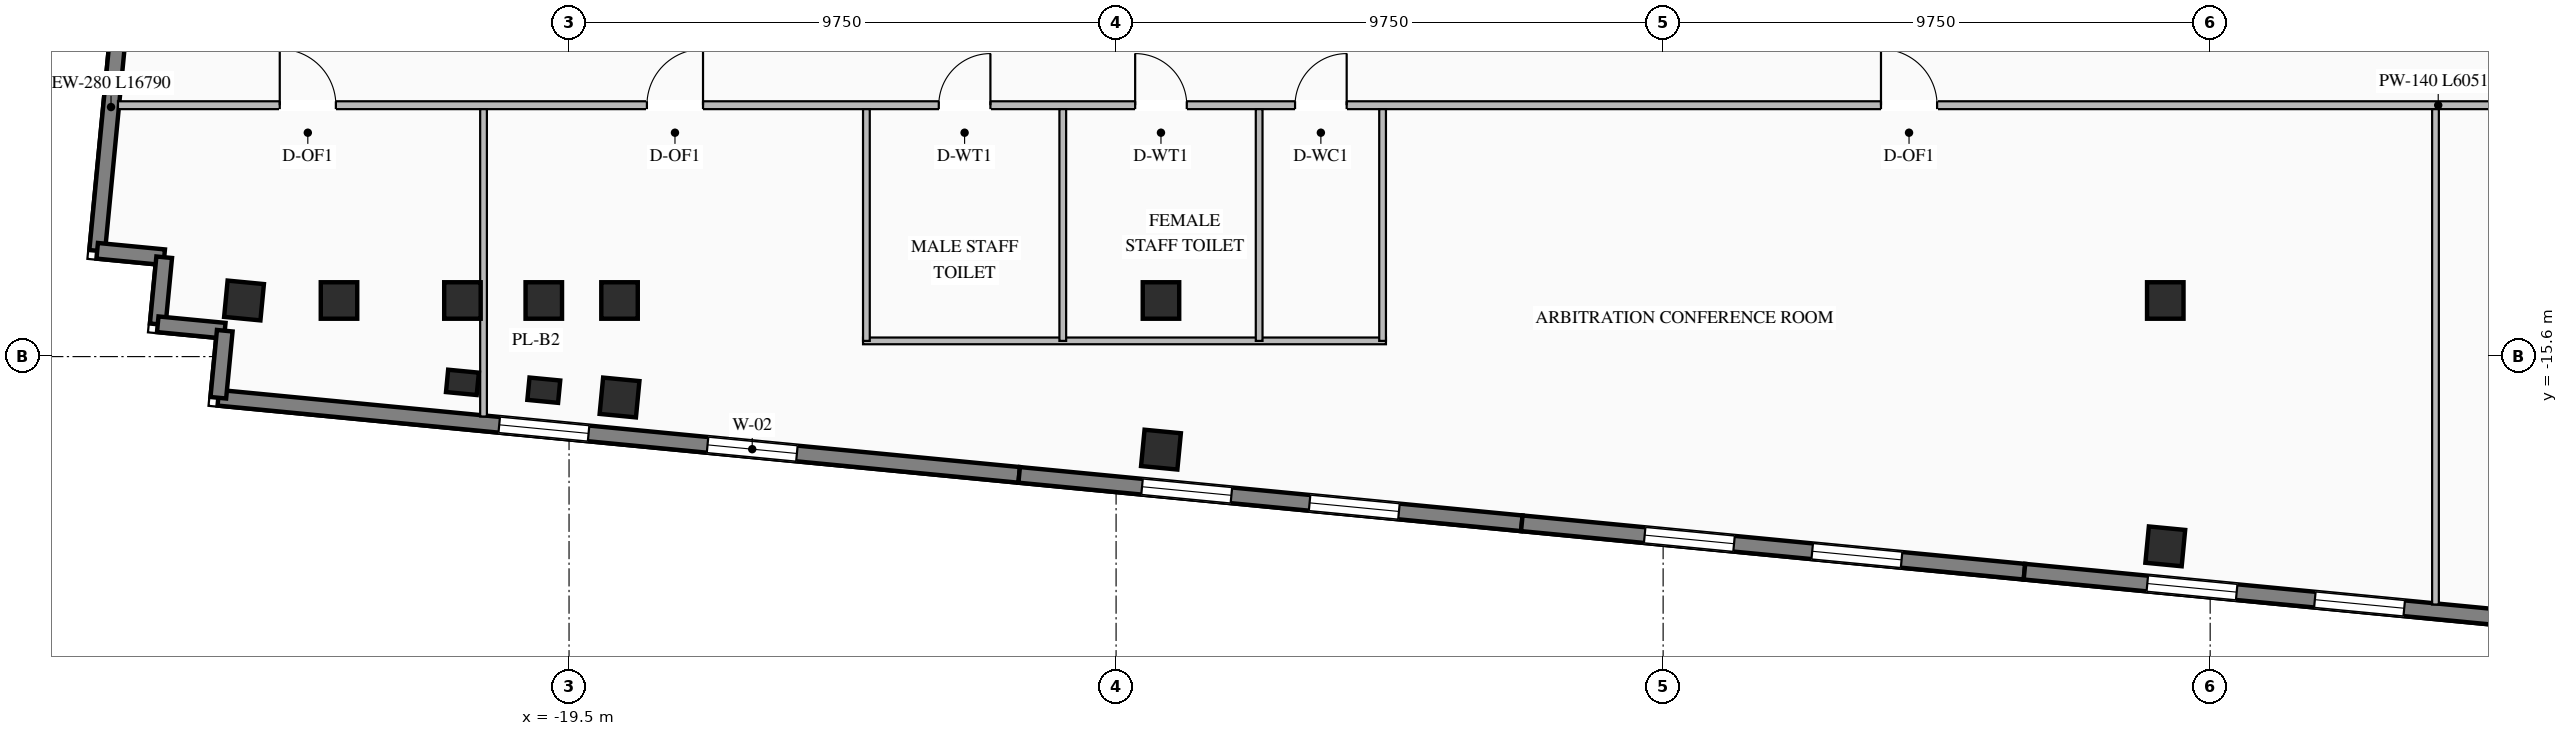
"""IFC4 building model, lengths in metres.
Left out: names, types, materials, properties, quantities, classifications, styles, units other than length and angle.
Written with IfcOpenShell. Run it as: python <this file> out.ifc"""

import sys

from ifc_helpers import new_model, si_unit, direction, frame, frame_2d, origin, origin_2d, place, context, subcontext, project, spatial, rectangle, i_section, extrude, element, fill, save


model = new_model("IFC4")
c1 = context("Model", 3, precision=1e-05, world=origin(), true_north=direction((0.0, 1.0)))
c2 = subcontext(c1, "Body", "Model", "MODEL_VIEW")
j1 = project(units=[si_unit("LENGTHUNIT", "METRE"), si_unit("PLANEANGLEUNIT", "RADIAN")], contexts=[c1])
p1 = place(None, origin())
s1 = spatial("IfcSite", under=j1, at=p1, CompositionType="ELEMENT")
p2 = place(p1, origin())
s2 = spatial("IfcBuilding", under=s1, at=p2, CompositionType="ELEMENT")
p3 = place(p2, frame((0.0, 0.0, 160.4)))
s3 = spatial("IfcBuildingStorey", under=s2, at=p3, CompositionType="ELEMENT", Elevation=160.4)
for number, where, z_axis, x_axis in (
    (1, (-21.4, -14.6, 0.0), (0.0, 0.0, 1.0), (1.0, 0.0, 0.0)),
    (2, (-19.95, -14.6, 0.0), (0.0, 0.0, 1.0), (1.0, 0.0, 0.0)),
    (3, (-18.6, -14.6, 0.0), (0.0, 0.0, 1.0), (1.0, 0.0, 0.0)),
    (4, (-8.95, -14.6, 0.0), (0.0, 0.0, 1.0), (1.0, 0.0, 0.0)),
    (5, (8.95, -14.6, 0.0), (0.0, 0.0, 1.0), (1.0, 0.0, 0.0)),
    (6, (-23.6, -14.6, 0.0), (0.0, 0.0, 1.0), (1.0, 0.0, 0.0)),
    (7, (-18.6, -16.329, 0.0), (0.0, 0.0, 1.0), (0.995, -0.096, 0.0)),
    (8, (-8.95, -17.258, 0.0), (0.0, 0.0, 1.0), (0.995, -0.096, 0.0)),
    (9, (8.95, -18.981, 0.0), (0.0, 0.0, 1.0), (0.995, -0.096, 0.0)),
    (10, (-25.293, -14.6, 0.0), (0.0, 0.0, 1.0), (0.995, -0.096, 0.0)),
):
    element("IfcColumn", number, at=place(p3, frame(where, z_axis=z_axis, x_axis=x_axis)), inside=s3, PredefinedType="COLUMN", context=c2, shape_type="SweptSolid", body=[
        extrude(i_section(OverallWidth=0.65, OverallDepth=0.65, WebThickness=0.028, FlangeThickness=0.04, at=origin_2d()), origin(), (0.0, 0.0, 1.0), 3.45),
    ])
for number, where, z_axis, x_axis in (
    (11, (-21.4, -16.059, 0.0), (0.0, 0.0, 1.0), (0.995, -0.096, 0.0)),
    (12, (-19.95, -16.199, 0.0), (0.0, 0.0, 1.0), (0.995, -0.096, 0.0)),
):
    element("IfcColumn", number, at=place(p3, frame(where, z_axis=z_axis, x_axis=x_axis)), inside=s3, PredefinedType="PILASTER", context=c2, shape_type="SweptSolid", body=[
        extrude(rectangle(XDim=0.55, YDim=0.4, at=origin_2d()), origin(), (0.0, 0.0, 1.0), 3.45),
    ])
p4 = place(p3, frame((-11.477, -17.708, 0.0), z_axis=(0.0, 0.0, 1.0), x_axis=(-0.995395762701, 0.095850276977, 0.0)))
e13 = element("IfcWall", 13, at=p4, inside=s3, PredefinedType="STANDARD", context=c2, shape_type="SweptSolid", body=[
    extrude(rectangle(XDim=14.34, YDim=0.28, at=frame_2d((7.17, 0.0))), origin(), (0.0, 0.0, 1.0), 3.25),
])
p5 = place(p4, frame((3.98, 0.0, 0.76)))
e14 = element("IfcOpeningElement", 14, at=p5, cuts=e13, PredefinedType="OPENING", context=c2, shape_type="SweptSolid", body=[
    extrude(rectangle(XDim=1.6, YDim=1.95, at=frame_2d((0.8, 0.975))), frame((0.0, 0.15, 0.0), z_axis=(0.0, -1.0, 0.0), x_axis=(1.0, 0.0, 0.0)), (0.0, 0.0, 1.0), 0.3),
])
p6 = place(p4, frame((7.71, 0.0, 0.76)))
e15 = element("IfcOpeningElement", 15, at=p6, cuts=e13, PredefinedType="OPENING", context=c2, shape_type="SweptSolid", body=[
    extrude(rectangle(XDim=1.6, YDim=1.95, at=frame_2d((0.8, 0.975))), frame((0.0, 0.15, 0.0), z_axis=(0.0, -1.0, 0.0), x_axis=(1.0, 0.0, 0.0)), (0.0, 0.0, 1.0), 0.3),
])
p7 = place(p3, frame((-2.519, -18.57, 0.0), z_axis=(0.0, 0.0, 1.0), x_axis=(-0.995396794462, 0.09583956164, 0.0)))
e16 = element("IfcWall", 16, at=p7, inside=s3, PredefinedType="STANDARD", context=c2, shape_type="SweptSolid", body=[
    extrude(rectangle(XDim=9.0, YDim=0.28, at=frame_2d((4.5, 0.0))), origin(), (0.0, 0.0, 1.0), 3.25),
])
p8 = place(p7, frame((2.2, 0.0, 0.76)))
e17 = element("IfcOpeningElement", 17, at=p8, cuts=e16, PredefinedType="OPENING", context=c2, shape_type="SweptSolid", body=[
    extrude(rectangle(XDim=1.6, YDim=1.95, at=frame_2d((0.8, 0.975))), frame((0.0, 0.15, 0.0), z_axis=(0.0, -1.0, 0.0), x_axis=(1.0, 0.0, 0.0)), (0.0, 0.0, 1.0), 0.3),
])
p9 = place(p7, frame((5.2, 0.0, 0.76)))
e18 = element("IfcOpeningElement", 18, at=p9, cuts=e16, PredefinedType="OPENING", context=c2, shape_type="SweptSolid", body=[
    extrude(rectangle(XDim=1.6, YDim=1.95, at=frame_2d((0.8, 0.975))), frame((0.0, 0.15, 0.0), z_axis=(0.0, -1.0, 0.0), x_axis=(1.0, 0.0, 0.0)), (0.0, 0.0, 1.0), 0.3),
])
p10 = place(p3, frame((6.44, -19.433, 0.0), z_axis=(0.0, 0.0, 1.0), x_axis=(-0.995396794462, 0.09583956164, 0.0)))
e19 = element("IfcWall", 19, at=p10, inside=s3, PredefinedType="STANDARD", context=c2, shape_type="SweptSolid", body=[
    extrude(rectangle(XDim=9.0, YDim=0.28, at=frame_2d((4.5, 0.0))), origin(), (0.0, 0.0, 1.0), 3.25),
])
p11 = place(p10, frame((2.2, 0.0, 0.76)))
e20 = element("IfcOpeningElement", 20, at=p11, cuts=e19, PredefinedType="OPENING", context=c2, shape_type="SweptSolid", body=[
    extrude(rectangle(XDim=1.6, YDim=1.95, at=frame_2d((0.8, 0.975))), frame((0.0, 0.15, 0.0), z_axis=(0.0, -1.0, 0.0), x_axis=(1.0, 0.0, 0.0)), (0.0, 0.0, 1.0), 0.3),
])
p12 = place(p10, frame((5.2, 0.0, 0.76)))
e21 = element("IfcOpeningElement", 21, at=p12, cuts=e19, PredefinedType="OPENING", context=c2, shape_type="SweptSolid", body=[
    extrude(rectangle(XDim=1.6, YDim=1.95, at=frame_2d((0.8, 0.975))), frame((0.0, 0.15, 0.0), z_axis=(0.0, -1.0, 0.0), x_axis=(1.0, 0.0, 0.0)), (0.0, 0.0, 1.0), 0.3),
])
p13 = place(p3, frame((15.399, -20.296, 0.0), z_axis=(0.0, 0.0, 1.0), x_axis=(-0.995394455533, 0.09586385082, 0.0)))
e22 = element("IfcWall", 22, at=p13, inside=s3, PredefinedType="STANDARD", context=c2, shape_type="SweptSolid", body=[
    extrude(rectangle(XDim=9.0, YDim=0.28, at=frame_2d((4.5, 0.0))), origin(), (0.0, 0.0, 1.0), 3.25),
])
p14 = place(p13, frame((2.2, 0.0, 0.76)))
e23 = element("IfcOpeningElement", 23, at=p14, cuts=e22, PredefinedType="OPENING", context=c2, shape_type="SweptSolid", body=[
    extrude(rectangle(XDim=1.6, YDim=1.95, at=frame_2d((0.8, 0.975))), frame((0.0, 0.15, 0.0), z_axis=(0.0, -1.0, 0.0), x_axis=(1.0, 0.0, 0.0)), (0.0, 0.0, 1.0), 0.3),
])
p15 = place(p13, frame((5.2, 0.0, 0.76)))
e24 = element("IfcOpeningElement", 24, at=p15, cuts=e22, PredefinedType="OPENING", context=c2, shape_type="SweptSolid", body=[
    extrude(rectangle(XDim=1.6, YDim=1.95, at=frame_2d((0.8, 0.975))), frame((0.0, 0.15, 0.0), z_axis=(0.0, -1.0, 0.0), x_axis=(1.0, 0.0, 0.0)), (0.0, 0.0, 1.0), 0.3),
])
p16 = place(p3, frame((-27.91, -13.714, 0.0), z_axis=(0.0, 0.0, 1.0), x_axis=(0.095839027265, 0.995396845913, 0.0)))
e25 = element("IfcWall", 25, at=p16, inside=s3, PredefinedType="STANDARD", context=c2, shape_type="SweptSolid", body=[
    extrude(rectangle(XDim=16.79, YDim=0.28, at=frame_2d((8.395, 0.0))), origin(), (0.0, 0.0, 1.0), 3.25),
])
p17 = place(p16, frame((5.147, 0.0, 0.76)))
e26 = element("IfcOpeningElement", 26, at=p17, cuts=e25, PredefinedType="OPENING", context=c2, shape_type="SweptSolid", body=[
    extrude(rectangle(XDim=2.0, YDim=2.05, at=frame_2d((1.0, 1.025))), frame((0.0, 0.15, 0.0), z_axis=(0.0, -1.0, 0.0), x_axis=(1.0, 0.0, 0.0)), (0.0, 0.0, 1.0), 0.3),
])
p18 = place(p16, frame((10.193, 0.0, 0.76)))
e27 = element("IfcOpeningElement", 27, at=p18, cuts=e25, PredefinedType="OPENING", context=c2, shape_type="SweptSolid", body=[
    extrude(rectangle(XDim=2.0, YDim=2.05, at=frame_2d((1.0, 1.025))), frame((0.0, 0.15, 0.0), z_axis=(0.0, -1.0, 0.0), x_axis=(1.0, 0.0, 0.0)), (0.0, 0.0, 1.0), 0.3),
])
p19 = place(p3, frame((-27.91, -13.714, 0.0), z_axis=(0.0, 0.0, 1.0), x_axis=(0.995397091755, -0.095836473879, 0.0)))
e28 = element("IfcWall", 28, at=p19, inside=s3, PredefinedType="STANDARD", context=c2, shape_type="SweptSolid", body=[
    extrude(rectangle(XDim=1.2, YDim=0.28, at=frame_2d((0.6, 0.0))), origin(), (0.0, 0.0, 1.0), 3.25),
])
for number, where, z_axis, x_axis in (
    (29, (-26.716, -13.829, 0.0), (0.0, 0.0, 1.0), (-0.096, -0.995, 0.0)),
    (30, (-26.831, -15.024, 0.0), (0.0, 0.0, 1.0), (0.995, -0.096, 0.0)),
):
    element("IfcWall", number, at=place(p3, frame(where, z_axis=z_axis, x_axis=x_axis)), inside=s3, PredefinedType="STANDARD", context=c2, shape_type="SweptSolid", body=[
        extrude(rectangle(XDim=1.2, YDim=0.28, at=frame_2d((0.6, 0.0))), origin(), (0.0, 0.0, 1.0), 3.25),
    ])
p20 = place(p3, frame((-25.636, -15.139, 0.0), z_axis=(0.0, 0.0, 1.0), x_axis=(-0.096038073607, -0.995377661201, 0.0)))
e31 = element("IfcWall", 31, at=p20, inside=s3, PredefinedType="STANDARD", context=c2, shape_type="SweptSolid", body=[
    extrude(rectangle(XDim=1.2, YDim=0.28, at=frame_2d((0.6, 0.0))), origin(), (0.0, 0.0, 1.0), 3.25),
])
p21 = place(p3, frame((-27.54, -11.12, 0.0), z_axis=(0.0, 0.0, 1.0), x_axis=(1.0, 0.0, 0.0)))
e32 = element("IfcWall", 32, at=p21, inside=s3, PredefinedType="STANDARD", context=c2, shape_type="SweptSolid", body=[
    extrude(rectangle(XDim=60.519, YDim=0.14, at=frame_2d((30.259, 0.0))), origin(), (0.0, 0.0, 1.0), 3.25),
])
p22 = place(p21, frame((14.63, 0.0, 0.0)))
e33 = element("IfcOpeningElement", 33, at=p22, cuts=e32, PredefinedType="OPENING", context=c2, shape_type="SweptSolid", body=[
    extrude(rectangle(XDim=0.92, YDim=2.08, at=frame_2d((0.46, 1.04))), frame((0.0, 0.08, 0.0), z_axis=(0.0, -1.0, 0.0), x_axis=(1.0, 0.0, 0.0)), (0.0, 0.0, 1.0), 0.16),
])
p23 = place(p21, frame((18.13, 0.0, 0.0)))
e34 = element("IfcOpeningElement", 34, at=p23, cuts=e32, PredefinedType="OPENING", context=c2, shape_type="SweptSolid", body=[
    extrude(rectangle(XDim=0.92, YDim=2.08, at=frame_2d((0.46, 1.04))), frame((0.0, 0.08, 0.0), z_axis=(0.0, -1.0, 0.0), x_axis=(1.0, 0.0, 0.0)), (0.0, 0.0, 1.0), 0.16),
])
p24 = place(p21, frame((20.98, 0.0, 0.0)))
e35 = element("IfcOpeningElement", 35, at=p24, cuts=e32, PredefinedType="OPENING", context=c2, shape_type="SweptSolid", body=[
    extrude(rectangle(XDim=0.92, YDim=2.08, at=frame_2d((0.46, 1.04))), frame((0.0, 0.08, 0.0), z_axis=(0.0, -1.0, 0.0), x_axis=(1.0, 0.0, 0.0)), (0.0, 0.0, 1.0), 0.16),
])
p25 = place(p21, frame((2.884, 0.0, 0.0)))
e36 = element("IfcOpeningElement", 36, at=p25, cuts=e32, PredefinedType="OPENING", context=c2, shape_type="SweptSolid", body=[
    extrude(rectangle(XDim=1.0, YDim=2.08, at=frame_2d((0.5, 1.04))), frame((0.0, 0.08, 0.0), z_axis=(0.0, -1.0, 0.0), x_axis=(1.0, 0.0, 0.0)), (0.0, 0.0, 1.0), 0.16),
])
p26 = place(p21, frame((9.428, 0.0, 0.0)))
e37 = element("IfcOpeningElement", 37, at=p26, cuts=e32, PredefinedType="OPENING", context=c2, shape_type="SweptSolid", body=[
    extrude(rectangle(XDim=1.0, YDim=2.08, at=frame_2d((0.5, 1.04))), frame((0.0, 0.08, 0.0), z_axis=(0.0, -1.0, 0.0), x_axis=(1.0, 0.0, 0.0)), (0.0, 0.0, 1.0), 0.16),
])
p27 = place(p21, frame((31.423, 0.0, 0.0)))
e38 = element("IfcOpeningElement", 38, at=p27, cuts=e32, PredefinedType="OPENING", context=c2, shape_type="SweptSolid", body=[
    extrude(rectangle(XDim=1.0, YDim=2.08, at=frame_2d((0.5, 1.04))), frame((0.0, 0.08, 0.0), z_axis=(0.0, -1.0, 0.0), x_axis=(1.0, 0.0, 0.0)), (0.0, 0.0, 1.0), 0.16),
])
p28 = place(p21, frame((50.286, 0.0, 0.0)))
e39 = element("IfcOpeningElement", 39, at=p28, cuts=e32, PredefinedType="OPENING", context=c2, shape_type="SweptSolid", body=[
    extrude(rectangle(XDim=1.0, YDim=2.08, at=frame_2d((0.5, 1.04))), frame((0.0, 0.08, 0.0), z_axis=(0.0, -1.0, 0.0), x_axis=(1.0, 0.0, 0.0)), (0.0, 0.0, 1.0), 0.16),
])
p29 = place(p3, frame((-14.26, -15.32, 0.0), z_axis=(0.0, 0.0, 1.0), x_axis=(1.0, 0.0, 0.0)))
e40 = element("IfcWall", 40, at=p29, inside=s3, PredefinedType="STANDARD", context=c2, shape_type="SweptSolid", body=[
    extrude(rectangle(XDim=9.32, YDim=0.12, at=frame_2d((4.66, 0.0))), origin(), (0.0, 0.0, 1.0), 3.25),
])
for number, where, z_axis, x_axis in (
    (41, (-14.2, -15.32, 0.0), (0.0, 0.0, 1.0), (0.0, 1.0, 0.0)),
    (42, (-10.7, -15.32, 0.0), (0.0, 0.0, 1.0), (0.0, 1.0, 0.0)),
    (43, (-7.2, -15.32, 0.0), (0.0, 0.0, 1.0), (0.0, 1.0, 0.0)),
    (44, (-5.0, -15.32, 0.0), (0.0, 0.0, 1.0), (0.0, 1.0, 0.0)),
):
    element("IfcWall", number, at=place(p3, frame(where, z_axis=z_axis, x_axis=x_axis)), inside=s3, PredefinedType="STANDARD", context=c2, shape_type="SweptSolid", body=[
        extrude(rectangle(XDim=4.13, YDim=0.12, at=frame_2d((2.065, 0.0))), origin(), (0.0, 0.0, 1.0), 3.25),
    ])
p30 = place(p3, frame((-21.024, -16.668, 0.0), z_axis=(0.0, 0.0, 1.0), x_axis=(0.0, 1.0, 0.0)))
e45 = element("IfcWall", 45, at=p30, inside=s3, PredefinedType="STANDARD", context=c2, shape_type="SweptSolid", body=[
    extrude(rectangle(XDim=5.478, YDim=0.12, at=frame_2d((2.739, 0.0))), origin(), (0.0, 0.0, 1.0), 3.25),
])
p31 = place(p3, frame((13.766, -20.018, 0.0), z_axis=(0.0, 0.0, 1.0), x_axis=(0.0, 1.0, 0.0)))
e46 = element("IfcWall", 46, at=p31, inside=s3, PredefinedType="STANDARD", context=c2, shape_type="SweptSolid", body=[
    extrude(rectangle(XDim=8.828, YDim=0.12, at=frame_2d((4.414, 0.0))), origin(), (0.0, 0.0, 1.0), 3.25),
])
p32 = place(p5, origin())
e47 = element("IfcWindow", 47, at=p32, inside=s3, PartitioningType="SINGLE_PANEL", PredefinedType="WINDOW", context=c2, shape_type="SweptSolid", body=[
    extrude(rectangle(XDim=1.6, YDim=1.95, at=frame_2d((0.8, 0.975))), frame((0.0, 0.03, 0.0), z_axis=(0.0, -1.0, 0.0), x_axis=(1.0, 0.0, 0.0)), (0.0, 0.0, 1.0), 0.06),
])
fill(e14, e47)
p33 = place(p6, origin())
e48 = element("IfcWindow", 48, at=p33, inside=s3, PartitioningType="SINGLE_PANEL", PredefinedType="WINDOW", context=c2, shape_type="SweptSolid", body=[
    extrude(rectangle(XDim=1.6, YDim=1.95, at=frame_2d((0.8, 0.975))), frame((0.0, 0.03, 0.0), z_axis=(0.0, -1.0, 0.0), x_axis=(1.0, 0.0, 0.0)), (0.0, 0.0, 1.0), 0.06),
])
fill(e15, e48)
p34 = place(p8, origin())
e49 = element("IfcWindow", 49, at=p34, inside=s3, PartitioningType="SINGLE_PANEL", PredefinedType="WINDOW", context=c2, shape_type="SweptSolid", body=[
    extrude(rectangle(XDim=1.6, YDim=1.95, at=frame_2d((0.8, 0.975))), frame((0.0, 0.03, 0.0), z_axis=(0.0, -1.0, 0.0), x_axis=(1.0, 0.0, 0.0)), (0.0, 0.0, 1.0), 0.06),
])
fill(e17, e49)
p35 = place(p9, origin())
e50 = element("IfcWindow", 50, at=p35, inside=s3, PartitioningType="SINGLE_PANEL", PredefinedType="WINDOW", context=c2, shape_type="SweptSolid", body=[
    extrude(rectangle(XDim=1.6, YDim=1.95, at=frame_2d((0.8, 0.975))), frame((0.0, 0.03, 0.0), z_axis=(0.0, -1.0, 0.0), x_axis=(1.0, 0.0, 0.0)), (0.0, 0.0, 1.0), 0.06),
])
fill(e18, e50)
p36 = place(p11, origin())
e51 = element("IfcWindow", 51, at=p36, inside=s3, PartitioningType="SINGLE_PANEL", PredefinedType="WINDOW", context=c2, shape_type="SweptSolid", body=[
    extrude(rectangle(XDim=1.6, YDim=1.95, at=frame_2d((0.8, 0.975))), frame((0.0, 0.03, 0.0), z_axis=(0.0, -1.0, 0.0), x_axis=(1.0, 0.0, 0.0)), (0.0, 0.0, 1.0), 0.06),
])
fill(e20, e51)
p37 = place(p12, origin())
e52 = element("IfcWindow", 52, at=p37, inside=s3, PartitioningType="SINGLE_PANEL", PredefinedType="WINDOW", context=c2, shape_type="SweptSolid", body=[
    extrude(rectangle(XDim=1.6, YDim=1.95, at=frame_2d((0.8, 0.975))), frame((0.0, 0.03, 0.0), z_axis=(0.0, -1.0, 0.0), x_axis=(1.0, 0.0, 0.0)), (0.0, 0.0, 1.0), 0.06),
])
fill(e21, e52)
p38 = place(p14, origin())
e53 = element("IfcWindow", 53, at=p38, inside=s3, PartitioningType="SINGLE_PANEL", PredefinedType="WINDOW", context=c2, shape_type="SweptSolid", body=[
    extrude(rectangle(XDim=1.6, YDim=1.95, at=frame_2d((0.8, 0.975))), frame((0.0, 0.03, 0.0), z_axis=(0.0, -1.0, 0.0), x_axis=(1.0, 0.0, 0.0)), (0.0, 0.0, 1.0), 0.06),
])
fill(e23, e53)
p39 = place(p15, origin())
e54 = element("IfcWindow", 54, at=p39, inside=s3, PartitioningType="SINGLE_PANEL", PredefinedType="WINDOW", context=c2, shape_type="SweptSolid", body=[
    extrude(rectangle(XDim=1.6, YDim=1.95, at=frame_2d((0.8, 0.975))), frame((0.0, 0.03, 0.0), z_axis=(0.0, -1.0, 0.0), x_axis=(1.0, 0.0, 0.0)), (0.0, 0.0, 1.0), 0.06),
])
fill(e24, e54)
p40 = place(p22, origin())
e55 = element("IfcDoor", 55, at=p40, inside=s3, OperationType="SINGLE_SWING_RIGHT", PredefinedType="DOOR", context=c2, shape_type="SweptSolid", body=[
    extrude(rectangle(XDim=0.92, YDim=2.08, at=frame_2d((0.46, 1.04))), frame((0.0, 0.025, 0.0), z_axis=(0.0, -1.0, 0.0), x_axis=(1.0, 0.0, 0.0)), (0.0, 0.0, 1.0), 0.05),
])
fill(e33, e55)
p41 = place(p23, origin())
e56 = element("IfcDoor", 56, at=p41, inside=s3, OperationType="SINGLE_SWING_LEFT", PredefinedType="DOOR", context=c2, shape_type="SweptSolid", body=[
    extrude(rectangle(XDim=0.92, YDim=2.08, at=frame_2d((0.46, 1.04))), frame((0.0, 0.025, 0.0), z_axis=(0.0, -1.0, 0.0), x_axis=(1.0, 0.0, 0.0)), (0.0, 0.0, 1.0), 0.05),
])
fill(e34, e56)
p42 = place(p24, origin())
e57 = element("IfcDoor", 57, at=p42, inside=s3, OperationType="SINGLE_SWING_RIGHT", PredefinedType="DOOR", context=c2, shape_type="SweptSolid", body=[
    extrude(rectangle(XDim=0.92, YDim=2.08, at=frame_2d((0.46, 1.04))), frame((0.0, 0.025, 0.0), z_axis=(0.0, -1.0, 0.0), x_axis=(1.0, 0.0, 0.0)), (0.0, 0.0, 1.0), 0.05),
])
fill(e35, e57)
p43 = place(p25, origin())
e58 = element("IfcDoor", 58, at=p43, inside=s3, OperationType="SINGLE_SWING_LEFT", PredefinedType="DOOR", context=c2, shape_type="SweptSolid", body=[
    extrude(rectangle(XDim=1.0, YDim=2.08, at=frame_2d((0.5, 1.04))), frame((0.0, 0.025, 0.0), z_axis=(0.0, -1.0, 0.0), x_axis=(1.0, 0.0, 0.0)), (0.0, 0.0, 1.0), 0.05),
])
fill(e36, e58)
p44 = place(p26, origin())
e59 = element("IfcDoor", 59, at=p44, inside=s3, OperationType="SINGLE_SWING_RIGHT", PredefinedType="DOOR", context=c2, shape_type="SweptSolid", body=[
    extrude(rectangle(XDim=1.0, YDim=2.08, at=frame_2d((0.5, 1.04))), frame((0.0, 0.025, 0.0), z_axis=(0.0, -1.0, 0.0), x_axis=(1.0, 0.0, 0.0)), (0.0, 0.0, 1.0), 0.05),
])
fill(e37, e59)
p45 = place(p27, origin())
e60 = element("IfcDoor", 60, at=p45, inside=s3, OperationType="SINGLE_SWING_LEFT", PredefinedType="DOOR", context=c2, shape_type="SweptSolid", body=[
    extrude(rectangle(XDim=1.0, YDim=2.08, at=frame_2d((0.5, 1.04))), frame((0.0, 0.025, 0.0), z_axis=(0.0, -1.0, 0.0), x_axis=(1.0, 0.0, 0.0)), (0.0, 0.0, 1.0), 0.05),
])
fill(e38, e60)
save(model, sys.argv[1])
